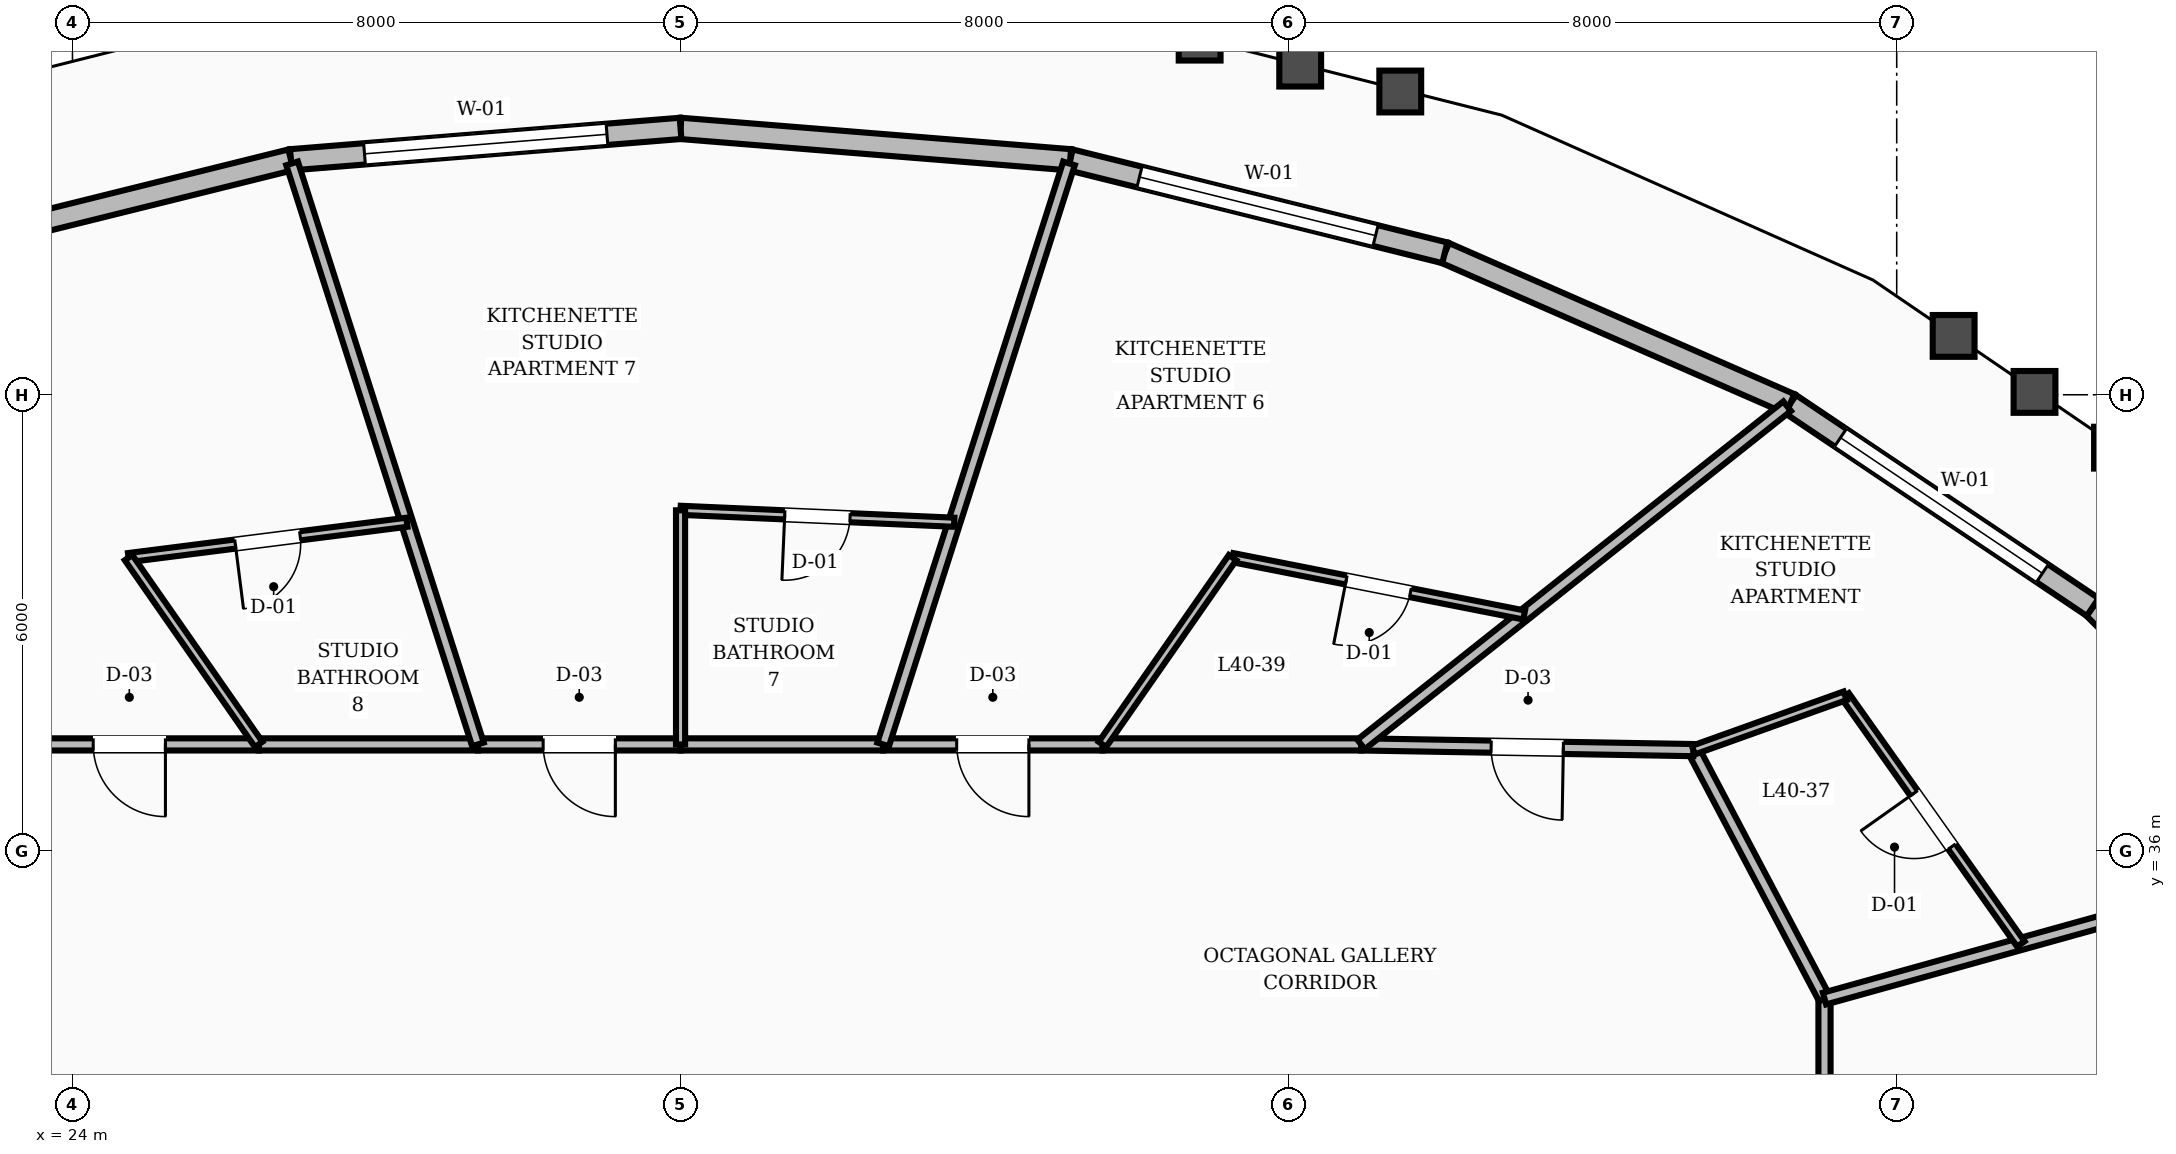
"""IFC4 building model, lengths in metres.
Left out: names, types, materials, properties, quantities, classifications, styles, units other than length and angle.
Written with IfcOpenShell. Run it as: python <this file> out.ifc"""

import sys

from ifc_helpers import new_model, si_unit, direction, frame, frame_2d, origin, place, context, subcontext, project, spatial, rectangle, extrude, element, fill, save


model = new_model("IFC4")
c1 = context("Model", 3, precision=1e-05, world=origin(), true_north=direction((0.0, 1.0)))
c2 = subcontext(c1, "Body", "Model", "MODEL_VIEW")
j1 = project(units=[si_unit("LENGTHUNIT", "METRE"), si_unit("PLANEANGLEUNIT", "RADIAN")], contexts=[c1])
p1 = place(None, origin())
s1 = spatial("IfcSite", under=j1, at=p1, CompositionType="ELEMENT")
p2 = place(p1, origin())
s2 = spatial("IfcBuilding", under=s1, at=p2, CompositionType="ELEMENT")
p3 = place(p2, frame((0.0, 0.0, 156.8)))
s3 = spatial("IfcBuildingStorey", under=s2, at=p3, CompositionType="ELEMENT", Elevation=156.8)
p4 = place(p3, frame((53.847, 35.947, 0.0), z_axis=(0.0, 0.0, 1.0), x_axis=(-0.708084852303, 0.706127355326, 0.0)))
e1 = element("IfcWall", 1, at=p4, inside=s3, PredefinedType="STANDARD", context=c2, shape_type="SweptSolid", body=[
    extrude(rectangle(XDim=4.615, YDim=0.28, at=frame_2d((2.307, 0.0))), origin(), (0.0, 0.0, 1.0), 2.82),
])
p5 = place(p3, frame((50.579, 39.206, 0.0), z_axis=(0.0, 0.0, 1.0), x_axis=(-0.830095249601, 0.557621624931, 0.0)))
e2 = element("IfcWall", 2, at=p5, inside=s3, PredefinedType="STANDARD", context=c2, shape_type="SweptSolid", body=[
    extrude(rectangle(XDim=4.796, YDim=0.28, at=frame_2d((2.398, 0.0))), origin(), (0.0, 0.0, 1.0), 2.82),
])
p6 = place(p5, frame((0.798, 0.0, 0.8)))
e3 = element("IfcOpeningElement", 3, at=p6, cuts=e2, PredefinedType="OPENING", context=c2, shape_type="SweptSolid", body=[
    extrude(rectangle(XDim=3.2, YDim=1.65, at=frame_2d((1.6, 0.825))), frame((0.0, 0.15, 0.0), z_axis=(0.0, -1.0, 0.0), x_axis=(1.0, 0.0, 0.0)), (0.0, 0.0, 1.0), 0.3),
])
p7 = place(p3, frame((46.598, 41.88, 0.0), z_axis=(0.0, 0.0, 1.0), x_axis=(-0.916185584373, 0.400754257603, 0.0)))
e4 = element("IfcWall", 4, at=p7, inside=s3, PredefinedType="STANDARD", context=c2, shape_type="SweptSolid", body=[
    extrude(rectangle(XDim=4.958, YDim=0.28, at=frame_2d((2.479, 0.0))), origin(), (0.0, 0.0, 1.0), 2.82),
])
p8 = place(p3, frame((42.055, 43.867, 0.0), z_axis=(0.0, 0.0, 1.0), x_axis=(-0.970528667517, 0.240985695689, 0.0)))
e5 = element("IfcWall", 5, at=p8, inside=s3, PredefinedType="STANDARD", context=c2, shape_type="SweptSolid", body=[
    extrude(rectangle(XDim=5.079, YDim=0.28, at=frame_2d((2.539, 0.0))), origin(), (0.0, 0.0, 1.0), 2.82),
])
p9 = place(p8, frame((0.939, 0.0, 0.8)))
e6 = element("IfcOpeningElement", 6, at=p9, cuts=e5, PredefinedType="OPENING", context=c2, shape_type="SweptSolid", body=[
    extrude(rectangle(XDim=3.2, YDim=1.65, at=frame_2d((1.6, 0.825))), frame((0.0, 0.15, 0.0), z_axis=(0.0, -1.0, 0.0), x_axis=(1.0, 0.0, 0.0)), (0.0, 0.0, 1.0), 0.3),
])
p10 = place(p3, frame((37.126, 45.091, 0.0), z_axis=(0.0, 0.0, 1.0), x_axis=(-0.996768616091, 0.080326371615, 0.0)))
e7 = element("IfcWall", 7, at=p10, inside=s3, PredefinedType="STANDARD", context=c2, shape_type="SweptSolid", body=[
    extrude(rectangle(XDim=5.143, YDim=0.28, at=frame_2d((2.571, 0.0))), origin(), (0.0, 0.0, 1.0), 2.82),
])
p11 = place(p3, frame((32.0, 45.504, 0.0), z_axis=(0.0, 0.0, 1.0), x_axis=(-0.996768616091, -0.080326371615, 0.0)))
e8 = element("IfcWall", 8, at=p11, inside=s3, PredefinedType="STANDARD", context=c2, shape_type="SweptSolid", body=[
    extrude(rectangle(XDim=5.143, YDim=0.28, at=frame_2d((2.571, 0.0))), origin(), (0.0, 0.0, 1.0), 2.82),
])
p12 = place(p11, frame((0.971, 0.0, 0.8)))
e9 = element("IfcOpeningElement", 9, at=p12, cuts=e8, PredefinedType="OPENING", context=c2, shape_type="SweptSolid", body=[
    extrude(rectangle(XDim=3.2, YDim=1.65, at=frame_2d((1.6, 0.825))), frame((0.0, 0.15, 0.0), z_axis=(0.0, -1.0, 0.0), x_axis=(1.0, 0.0, 0.0)), (0.0, 0.0, 1.0), 0.3),
])
p13 = place(p3, frame((26.874, 45.091, 0.0), z_axis=(0.0, 0.0, 1.0), x_axis=(-0.970528667517, -0.240985695689, 0.0)))
e10 = element("IfcWall", 10, at=p13, inside=s3, PredefinedType="STANDARD", context=c2, shape_type="SweptSolid", body=[
    extrude(rectangle(XDim=5.079, YDim=0.28, at=frame_2d((2.539, 0.0))), origin(), (0.0, 0.0, 1.0), 2.82),
])
p14 = place(p3, frame((47.05, 30.234, 0.0), z_axis=(0.0, 0.0, 1.0), x_axis=(0.0, 1.0, 0.0)))
e11 = element("IfcWall", 11, at=p14, inside=s3, PredefinedType="SOLIDWALL", context=c2, shape_type="SweptSolid", body=[
    extrude(rectangle(XDim=3.822, YDim=0.16, at=frame_2d((1.911, 0.0))), origin(), (0.0, 0.0, 1.0), 2.8),
])
p15 = place(p14, frame((1.436, 0.0, 0.0)))
e12 = element("IfcOpeningElement", 12, at=p15, cuts=e11, PredefinedType="OPENING", context=c2, shape_type="SweptSolid", body=[
    extrude(rectangle(XDim=0.95, YDim=2.1, at=frame_2d((0.475, 1.05))), frame((0.0, 0.09, 0.0), z_axis=(0.0, -1.0, 0.0), x_axis=(1.0, 0.0, 0.0)), (0.0, 0.0, 1.0), 0.18),
])
p16 = place(p3, frame((47.05, 34.056, 0.0), z_axis=(0.0, 0.0, 1.0), x_axis=(-0.466737093093, 0.884396113702, 0.0)))
e13 = element("IfcWall", 13, at=p16, inside=s3, PredefinedType="SOLIDWALL", context=c2, shape_type="SweptSolid", body=[
    extrude(rectangle(XDim=3.696, YDim=0.16, at=frame_2d((1.848, 0.0))), origin(), (0.0, 0.0, 1.0), 2.8),
])
p17 = place(p3, frame((45.325, 37.325, 0.0), z_axis=(0.0, 0.0, 1.0), x_axis=(-0.999853038912, 0.017143528788, 0.0)))
e14 = element("IfcWall", 14, at=p17, inside=s3, PredefinedType="SOLIDWALL", context=c2, shape_type="SweptSolid", body=[
    extrude(rectangle(XDim=4.372, YDim=0.16, at=frame_2d((2.186, 0.0))), origin(), (0.0, 0.0, 1.0), 2.8),
])
p18 = place(p17, frame((1.711, 0.0, 0.0)))
e15 = element("IfcOpeningElement", 15, at=p18, cuts=e14, PredefinedType="OPENING", context=c2, shape_type="SweptSolid", body=[
    extrude(rectangle(XDim=0.95, YDim=2.1, at=frame_2d((0.475, 1.05))), frame((0.0, 0.09, 0.0), z_axis=(0.0, -1.0, 0.0), x_axis=(1.0, 0.0, 0.0)), (0.0, 0.0, 1.0), 0.18),
])
p19 = place(p3, frame((40.954, 37.4, 0.0), z_axis=(0.0, 0.0, 1.0), x_axis=(-1.0, 0.0, 0.0)))
e16 = element("IfcWall", 16, at=p19, inside=s3, PredefinedType="SOLIDWALL", context=c2, shape_type="SweptSolid", body=[
    extrude(rectangle(XDim=3.403, YDim=0.16, at=frame_2d((1.702, 0.0))), origin(), (0.0, 0.0, 1.0), 2.8),
])
p20 = place(p3, frame((37.551, 37.4, 0.0), z_axis=(0.0, 0.0, 1.0), x_axis=(-1.0, 0.0, 0.0)))
e17 = element("IfcWall", 17, at=p20, inside=s3, PredefinedType="SOLIDWALL", context=c2, shape_type="SweptSolid", body=[
    extrude(rectangle(XDim=2.885, YDim=0.16, at=frame_2d((1.443, 0.0))), origin(), (0.0, 0.0, 1.0), 2.8),
])
p21 = place(p20, frame((0.968, 0.0, 0.0)))
e18 = element("IfcOpeningElement", 18, at=p21, cuts=e17, PredefinedType="OPENING", context=c2, shape_type="SweptSolid", body=[
    extrude(rectangle(XDim=0.95, YDim=2.1, at=frame_2d((0.475, 1.05))), frame((0.0, 0.09, 0.0), z_axis=(0.0, -1.0, 0.0), x_axis=(1.0, 0.0, 0.0)), (0.0, 0.0, 1.0), 0.18),
])
p22 = place(p3, frame((34.665, 37.4, 0.0), z_axis=(0.0, 0.0, 1.0), x_axis=(-1.0, 0.0, 0.0)))
e19 = element("IfcWall", 19, at=p22, inside=s3, PredefinedType="SOLIDWALL", context=c2, shape_type="SweptSolid", body=[
    extrude(rectangle(XDim=2.665, YDim=0.16, at=frame_2d((1.333, 0.0))), origin(), (0.0, 0.0, 1.0), 2.8),
])
p23 = place(p3, frame((32.0, 37.4, 0.0), z_axis=(0.0, 0.0, 1.0), x_axis=(-1.0, 0.0, 0.0)))
e20 = element("IfcWall", 20, at=p23, inside=s3, PredefinedType="SOLIDWALL", context=c2, shape_type="SweptSolid", body=[
    extrude(rectangle(XDim=2.665, YDim=0.16, at=frame_2d((1.333, 0.0))), origin(), (0.0, 0.0, 1.0), 2.8),
])
p24 = place(p23, frame((0.858, 0.0, 0.0)))
e21 = element("IfcOpeningElement", 21, at=p24, cuts=e20, PredefinedType="OPENING", context=c2, shape_type="SweptSolid", body=[
    extrude(rectangle(XDim=0.95, YDim=2.1, at=frame_2d((0.475, 1.05))), frame((0.0, 0.09, 0.0), z_axis=(0.0, -1.0, 0.0), x_axis=(1.0, 0.0, 0.0)), (0.0, 0.0, 1.0), 0.18),
])
p25 = place(p3, frame((29.335, 37.4, 0.0), z_axis=(0.0, 0.0, 1.0), x_axis=(-1.0, 0.0, 0.0)))
e22 = element("IfcWall", 22, at=p25, inside=s3, PredefinedType="SOLIDWALL", context=c2, shape_type="SweptSolid", body=[
    extrude(rectangle(XDim=2.885, YDim=0.16, at=frame_2d((1.443, 0.0))), origin(), (0.0, 0.0, 1.0), 2.8),
])
p26 = place(p3, frame((26.449, 37.4, 0.0), z_axis=(0.0, 0.0, 1.0), x_axis=(-1.0, 0.0, 0.0)))
e23 = element("IfcWall", 23, at=p26, inside=s3, PredefinedType="SOLIDWALL", context=c2, shape_type="SweptSolid", body=[
    extrude(rectangle(XDim=3.403, YDim=0.16, at=frame_2d((1.702, 0.0))), origin(), (0.0, 0.0, 1.0), 2.8),
])
p27 = place(p26, frame((1.227, 0.0, 0.0)))
e24 = element("IfcOpeningElement", 24, at=p27, cuts=e23, PredefinedType="OPENING", context=c2, shape_type="SweptSolid", body=[
    extrude(rectangle(XDim=0.95, YDim=2.1, at=frame_2d((0.475, 1.05))), frame((0.0, 0.09, 0.0), z_axis=(0.0, -1.0, 0.0), x_axis=(1.0, 0.0, 0.0)), (0.0, 0.0, 1.0), 0.18),
])
p28 = place(p3, frame((47.05, 34.056, 0.0), z_axis=(0.0, 0.0, 1.0), x_axis=(0.9634039763, 0.268053685758, 0.0)))
e25 = element("IfcWall", 25, at=p28, inside=s3, PredefinedType="SOLIDWALL", context=c2, shape_type="SweptSolid", body=[
    extrude(rectangle(XDim=7.005, YDim=0.16, at=frame_2d((3.502, 0.0))), origin(), (0.0, 0.0, 1.0), 2.8),
])
p29 = place(p3, frame((49.633, 34.775, 0.0), z_axis=(0.0, 0.0, 1.0), x_axis=(-0.577763318474, 0.816204354207, 0.0)))
e26 = element("IfcWall", 26, at=p29, inside=s3, PredefinedType="PARTITIONING", context=c2, shape_type="SweptSolid", body=[
    extrude(rectangle(XDim=4.0, YDim=0.12, at=frame_2d((2.0, 0.0))), origin(), (0.0, 0.0, 1.0), 2.8),
])
p30 = place(p29, frame((1.57, 0.0, 0.0)))
e27 = element("IfcOpeningElement", 27, at=p30, cuts=e26, PredefinedType="OPENING", context=c2, shape_type="SweptSolid", body=[
    extrude(rectangle(XDim=0.86, YDim=2.1, at=frame_2d((0.43, 1.05))), frame((0.0, 0.07, 0.0), z_axis=(0.0, -1.0, 0.0), x_axis=(1.0, 0.0, 0.0)), (0.0, 0.0, 1.0), 0.14),
])
p31 = place(p3, frame((45.325, 37.325, 0.0), z_axis=(0.0, 0.0, 1.0), x_axis=(0.94147594933, 0.33708016381, 0.0)))
e28 = element("IfcWall", 28, at=p31, inside=s3, PredefinedType="PARTITIONING", context=c2, shape_type="SweptSolid", body=[
    extrude(rectangle(XDim=2.121, YDim=0.12, at=frame_2d((1.06, 0.0))), origin(), (0.0, 0.0, 1.0), 2.8),
])
p32 = place(p3, frame((40.954, 37.4, 0.0), z_axis=(0.0, 0.0, 1.0), x_axis=(0.783219810205, 0.621744906616, 0.0)))
e29 = element("IfcWall", 29, at=p32, inside=s3, PredefinedType="SOLIDWALL", context=c2, shape_type="SweptSolid", body=[
    extrude(rectangle(XDim=7.156, YDim=0.16, at=frame_2d((3.578, 0.0))), origin(), (0.0, 0.0, 1.0), 2.8),
])
p33 = place(p3, frame((43.098, 39.103, 0.0), z_axis=(0.0, 0.0, 1.0), x_axis=(-0.981171766557, 0.19313716502, 0.0)))
e30 = element("IfcWall", 30, at=p33, inside=s3, PredefinedType="PARTITIONING", context=c2, shape_type="SweptSolid", body=[
    extrude(rectangle(XDim=3.91, YDim=0.12, at=frame_2d((1.955, 0.0))), origin(), (0.0, 0.0, 1.0), 2.8),
])
p34 = place(p33, frame((1.525, 0.0, 0.0)))
e31 = element("IfcOpeningElement", 31, at=p34, cuts=e30, PredefinedType="OPENING", context=c2, shape_type="SweptSolid", body=[
    extrude(rectangle(XDim=0.86, YDim=2.1, at=frame_2d((0.43, 1.05))), frame((0.0, 0.07, 0.0), z_axis=(0.0, -1.0, 0.0), x_axis=(1.0, 0.0, 0.0)), (0.0, 0.0, 1.0), 0.14),
])
p35 = place(p3, frame((37.551, 37.4, 0.0), z_axis=(0.0, 0.0, 1.0), x_axis=(0.571496694362, 0.820604367728, 0.0)))
e32 = element("IfcWall", 32, at=p35, inside=s3, PredefinedType="PARTITIONING", context=c2, shape_type="SweptSolid", body=[
    extrude(rectangle(XDim=2.995, YDim=0.12, at=frame_2d((1.498, 0.0))), origin(), (0.0, 0.0, 1.0), 2.8),
])
p36 = place(p3, frame((34.665, 37.4, 0.0), z_axis=(0.0, 0.0, 1.0), x_axis=(0.304723848151, 0.952440746907, 0.0)))
e33 = element("IfcWall", 33, at=p36, inside=s3, PredefinedType="SOLIDWALL", context=c2, shape_type="SweptSolid", body=[
    extrude(rectangle(XDim=8.025, YDim=0.16, at=frame_2d((4.013, 0.0))), origin(), (0.0, 0.0, 1.0), 2.8),
])
p37 = place(p3, frame((35.6, 40.323, 0.0), z_axis=(0.0, 0.0, 1.0), x_axis=(-0.999050782171, 0.043560700681, 0.0)))
e34 = element("IfcWall", 34, at=p37, inside=s3, PredefinedType="PARTITIONING", context=c2, shape_type="SweptSolid", body=[
    extrude(rectangle(XDim=3.604, YDim=0.12, at=frame_2d((1.802, 0.0))), origin(), (0.0, 0.0, 1.0), 2.8),
])
p38 = place(p37, frame((1.372, 0.0, 0.0)))
e35 = element("IfcOpeningElement", 35, at=p38, cuts=e34, PredefinedType="OPENING", context=c2, shape_type="SweptSolid", body=[
    extrude(rectangle(XDim=0.86, YDim=2.1, at=frame_2d((0.43, 1.05))), frame((0.0, 0.07, 0.0), z_axis=(0.0, -1.0, 0.0), x_axis=(1.0, 0.0, 0.0)), (0.0, 0.0, 1.0), 0.14),
])
p39 = place(p3, frame((32.0, 37.4, 0.0), z_axis=(0.0, 0.0, 1.0), x_axis=(0.0, 1.0, 0.0)))
e36 = element("IfcWall", 36, at=p39, inside=s3, PredefinedType="PARTITIONING", context=c2, shape_type="SweptSolid", body=[
    extrude(rectangle(XDim=3.08, YDim=0.12, at=frame_2d((1.54, 0.0))), origin(), (0.0, 0.0, 1.0), 2.8),
])
p40 = place(p3, frame((29.335, 37.4, 0.0), z_axis=(0.0, 0.0, 1.0), x_axis=(-0.304723848151, 0.952440746907, 0.0)))
e37 = element("IfcWall", 37, at=p40, inside=s3, PredefinedType="SOLIDWALL", context=c2, shape_type="SweptSolid", body=[
    extrude(rectangle(XDim=8.025, YDim=0.16, at=frame_2d((4.013, 0.0))), origin(), (0.0, 0.0, 1.0), 2.8),
])
p41 = place(p3, frame((28.4, 40.323, 0.0), z_axis=(0.0, 0.0, 1.0), x_axis=(-0.9920307114, -0.125996300101, 0.0)))
e38 = element("IfcWall", 38, at=p41, inside=s3, PredefinedType="PARTITIONING", context=c2, shape_type="SweptSolid", body=[
    extrude(rectangle(XDim=3.691, YDim=0.12, at=frame_2d((1.846, 0.0))), origin(), (0.0, 0.0, 1.0), 2.8),
])
p42 = place(p41, frame((1.416, 0.0, 0.0)))
e39 = element("IfcOpeningElement", 39, at=p42, cuts=e38, PredefinedType="OPENING", context=c2, shape_type="SweptSolid", body=[
    extrude(rectangle(XDim=0.86, YDim=2.1, at=frame_2d((0.43, 1.05))), frame((0.0, 0.07, 0.0), z_axis=(0.0, -1.0, 0.0), x_axis=(1.0, 0.0, 0.0)), (0.0, 0.0, 1.0), 0.14),
])
p43 = place(p3, frame((26.449, 37.4, 0.0), z_axis=(0.0, 0.0, 1.0), x_axis=(-0.571496694362, 0.820604367728, 0.0)))
e40 = element("IfcWall", 40, at=p43, inside=s3, PredefinedType="PARTITIONING", context=c2, shape_type="SweptSolid", body=[
    extrude(rectangle(XDim=2.995, YDim=0.12, at=frame_2d((1.498, 0.0))), origin(), (0.0, 0.0, 1.0), 2.8),
])
p44 = place(p6, origin())
e41 = element("IfcWindow", 41, at=p44, inside=s3, PartitioningType="SINGLE_PANEL", PredefinedType="WINDOW", context=c2, shape_type="SweptSolid", body=[
    extrude(rectangle(XDim=3.2, YDim=1.65, at=frame_2d((1.6, 0.825))), frame((0.0, 0.03, 0.0), z_axis=(0.0, -1.0, 0.0), x_axis=(1.0, 0.0, 0.0)), (0.0, 0.0, 1.0), 0.06),
])
fill(e3, e41)
p45 = place(p9, origin())
e42 = element("IfcWindow", 42, at=p45, inside=s3, PartitioningType="SINGLE_PANEL", PredefinedType="WINDOW", context=c2, shape_type="SweptSolid", body=[
    extrude(rectangle(XDim=3.2, YDim=1.65, at=frame_2d((1.6, 0.825))), frame((0.0, 0.03, 0.0), z_axis=(0.0, -1.0, 0.0), x_axis=(1.0, 0.0, 0.0)), (0.0, 0.0, 1.0), 0.06),
])
fill(e6, e42)
p46 = place(p12, origin())
e43 = element("IfcWindow", 43, at=p46, inside=s3, PartitioningType="SINGLE_PANEL", PredefinedType="WINDOW", context=c2, shape_type="SweptSolid", body=[
    extrude(rectangle(XDim=3.2, YDim=1.65, at=frame_2d((1.6, 0.825))), frame((0.0, 0.03, 0.0), z_axis=(0.0, -1.0, 0.0), x_axis=(1.0, 0.0, 0.0)), (0.0, 0.0, 1.0), 0.06),
])
fill(e9, e43)
p47 = place(p30, origin())
e44 = element("IfcDoor", 44, at=p47, inside=s3, OperationType="SINGLE_SWING_RIGHT", PredefinedType="DOOR", context=c2, shape_type="SweptSolid", body=[
    extrude(rectangle(XDim=0.86, YDim=2.1, at=frame_2d((0.43, 1.05))), frame((0.0, 0.025, 0.0), z_axis=(0.0, -1.0, 0.0), x_axis=(1.0, 0.0, 0.0)), (0.0, 0.0, 1.0), 0.05),
])
fill(e27, e44)
p48 = place(p18, origin())
e45 = element("IfcDoor", 45, at=p48, inside=s3, OperationType="SINGLE_SWING_LEFT", PredefinedType="DOOR", context=c2, shape_type="SweptSolid", body=[
    extrude(rectangle(XDim=0.95, YDim=2.1, at=frame_2d((0.475, 1.05))), frame((0.0, 0.025, 0.0), z_axis=(0.0, -1.0, 0.0), x_axis=(1.0, 0.0, 0.0)), (0.0, 0.0, 1.0), 0.05),
])
fill(e15, e45)
p49 = place(p34, origin())
e46 = element("IfcDoor", 46, at=p49, inside=s3, OperationType="SINGLE_SWING_RIGHT", PredefinedType="DOOR", context=c2, shape_type="SweptSolid", body=[
    extrude(rectangle(XDim=0.86, YDim=2.1, at=frame_2d((0.43, 1.05))), frame((0.0, 0.025, 0.0), z_axis=(0.0, -1.0, 0.0), x_axis=(1.0, 0.0, 0.0)), (0.0, 0.0, 1.0), 0.05),
])
fill(e31, e46)
p50 = place(p21, origin())
e47 = element("IfcDoor", 47, at=p50, inside=s3, OperationType="SINGLE_SWING_LEFT", PredefinedType="DOOR", context=c2, shape_type="SweptSolid", body=[
    extrude(rectangle(XDim=0.95, YDim=2.1, at=frame_2d((0.475, 1.05))), frame((0.0, 0.025, 0.0), z_axis=(0.0, -1.0, 0.0), x_axis=(1.0, 0.0, 0.0)), (0.0, 0.0, 1.0), 0.05),
])
fill(e18, e47)
p51 = place(p38, origin())
e48 = element("IfcDoor", 48, at=p51, inside=s3, OperationType="SINGLE_SWING_RIGHT", PredefinedType="DOOR", context=c2, shape_type="SweptSolid", body=[
    extrude(rectangle(XDim=0.86, YDim=2.1, at=frame_2d((0.43, 1.05))), frame((0.0, 0.025, 0.0), z_axis=(0.0, -1.0, 0.0), x_axis=(1.0, 0.0, 0.0)), (0.0, 0.0, 1.0), 0.05),
])
fill(e35, e48)
p52 = place(p24, origin())
e49 = element("IfcDoor", 49, at=p52, inside=s3, OperationType="SINGLE_SWING_LEFT", PredefinedType="DOOR", context=c2, shape_type="SweptSolid", body=[
    extrude(rectangle(XDim=0.95, YDim=2.1, at=frame_2d((0.475, 1.05))), frame((0.0, 0.025, 0.0), z_axis=(0.0, -1.0, 0.0), x_axis=(1.0, 0.0, 0.0)), (0.0, 0.0, 1.0), 0.05),
])
fill(e21, e49)
p53 = place(p42, origin())
e50 = element("IfcDoor", 50, at=p53, inside=s3, OperationType="SINGLE_SWING_RIGHT", PredefinedType="DOOR", context=c2, shape_type="SweptSolid", body=[
    extrude(rectangle(XDim=0.86, YDim=2.1, at=frame_2d((0.43, 1.05))), frame((0.0, 0.025, 0.0), z_axis=(0.0, -1.0, 0.0), x_axis=(1.0, 0.0, 0.0)), (0.0, 0.0, 1.0), 0.05),
])
fill(e39, e50)
p54 = place(p27, origin())
e51 = element("IfcDoor", 51, at=p54, inside=s3, OperationType="SINGLE_SWING_LEFT", PredefinedType="DOOR", context=c2, shape_type="SweptSolid", body=[
    extrude(rectangle(XDim=0.95, YDim=2.1, at=frame_2d((0.475, 1.05))), frame((0.0, 0.025, 0.0), z_axis=(0.0, -1.0, 0.0), x_axis=(1.0, 0.0, 0.0)), (0.0, 0.0, 1.0), 0.05),
])
fill(e24, e51)
save(model, sys.argv[1])
